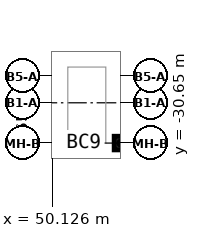
"""IFC4 building model, lengths in metres.
Left out: names, types, materials, properties, quantities, classifications, styles, units other than length and angle.
Written with IfcOpenShell. Run it as: python <this file> out.ifc"""

import sys

from ifc_helpers import new_model, si_unit, direction, frame, origin, origin_2d, place, context, subcontext, project, spatial, rectangle, extrude, source, transform, mapped, element, save


model = new_model("IFC4")
c1 = context("Model", 3, precision=1e-05, world=origin(), true_north=direction((0.0, 1.0)))
c2 = subcontext(c1, "Body", "Model", "MODEL_VIEW")
j1 = project(units=[si_unit("LENGTHUNIT", "METRE"), si_unit("PLANEANGLEUNIT", "RADIAN")], contexts=[c1])
p1 = place(None, origin())
s1 = spatial("IfcSite", under=j1, at=p1, CompositionType="ELEMENT")
p2 = place(p1, origin())
s2 = spatial("IfcBuilding", under=s1, at=p2, CompositionType="ELEMENT")
p3 = place(p2, frame((0.0, 0.0, -4.5)))
s3 = spatial("IfcBuildingStorey", under=s2, at=p3, CompositionType="ELEMENT", Elevation=-4.5)
m1 = source(origin(), c2, "Body", "SweptSolid", [
    extrude(rectangle(XDim=0.9, YDim=0.9, at=origin_2d()), origin(), (0.0, 0.0, 1.0), 4.5),
])
p4 = place(p3, frame((54.65, -30.65, 0.0), z_axis=(0.0, 0.0, 1.0), x_axis=(1.0, 0.0, 0.0)))
e1 = element("IfcColumn", 1, at=p4, inside=s3, PredefinedType="COLUMN", context=c2, shape_type="MappedRepresentation", body=[
    mapped(m1, transform((0.0, 0.0, 0.0))),
])
save(model, sys.argv[1])
